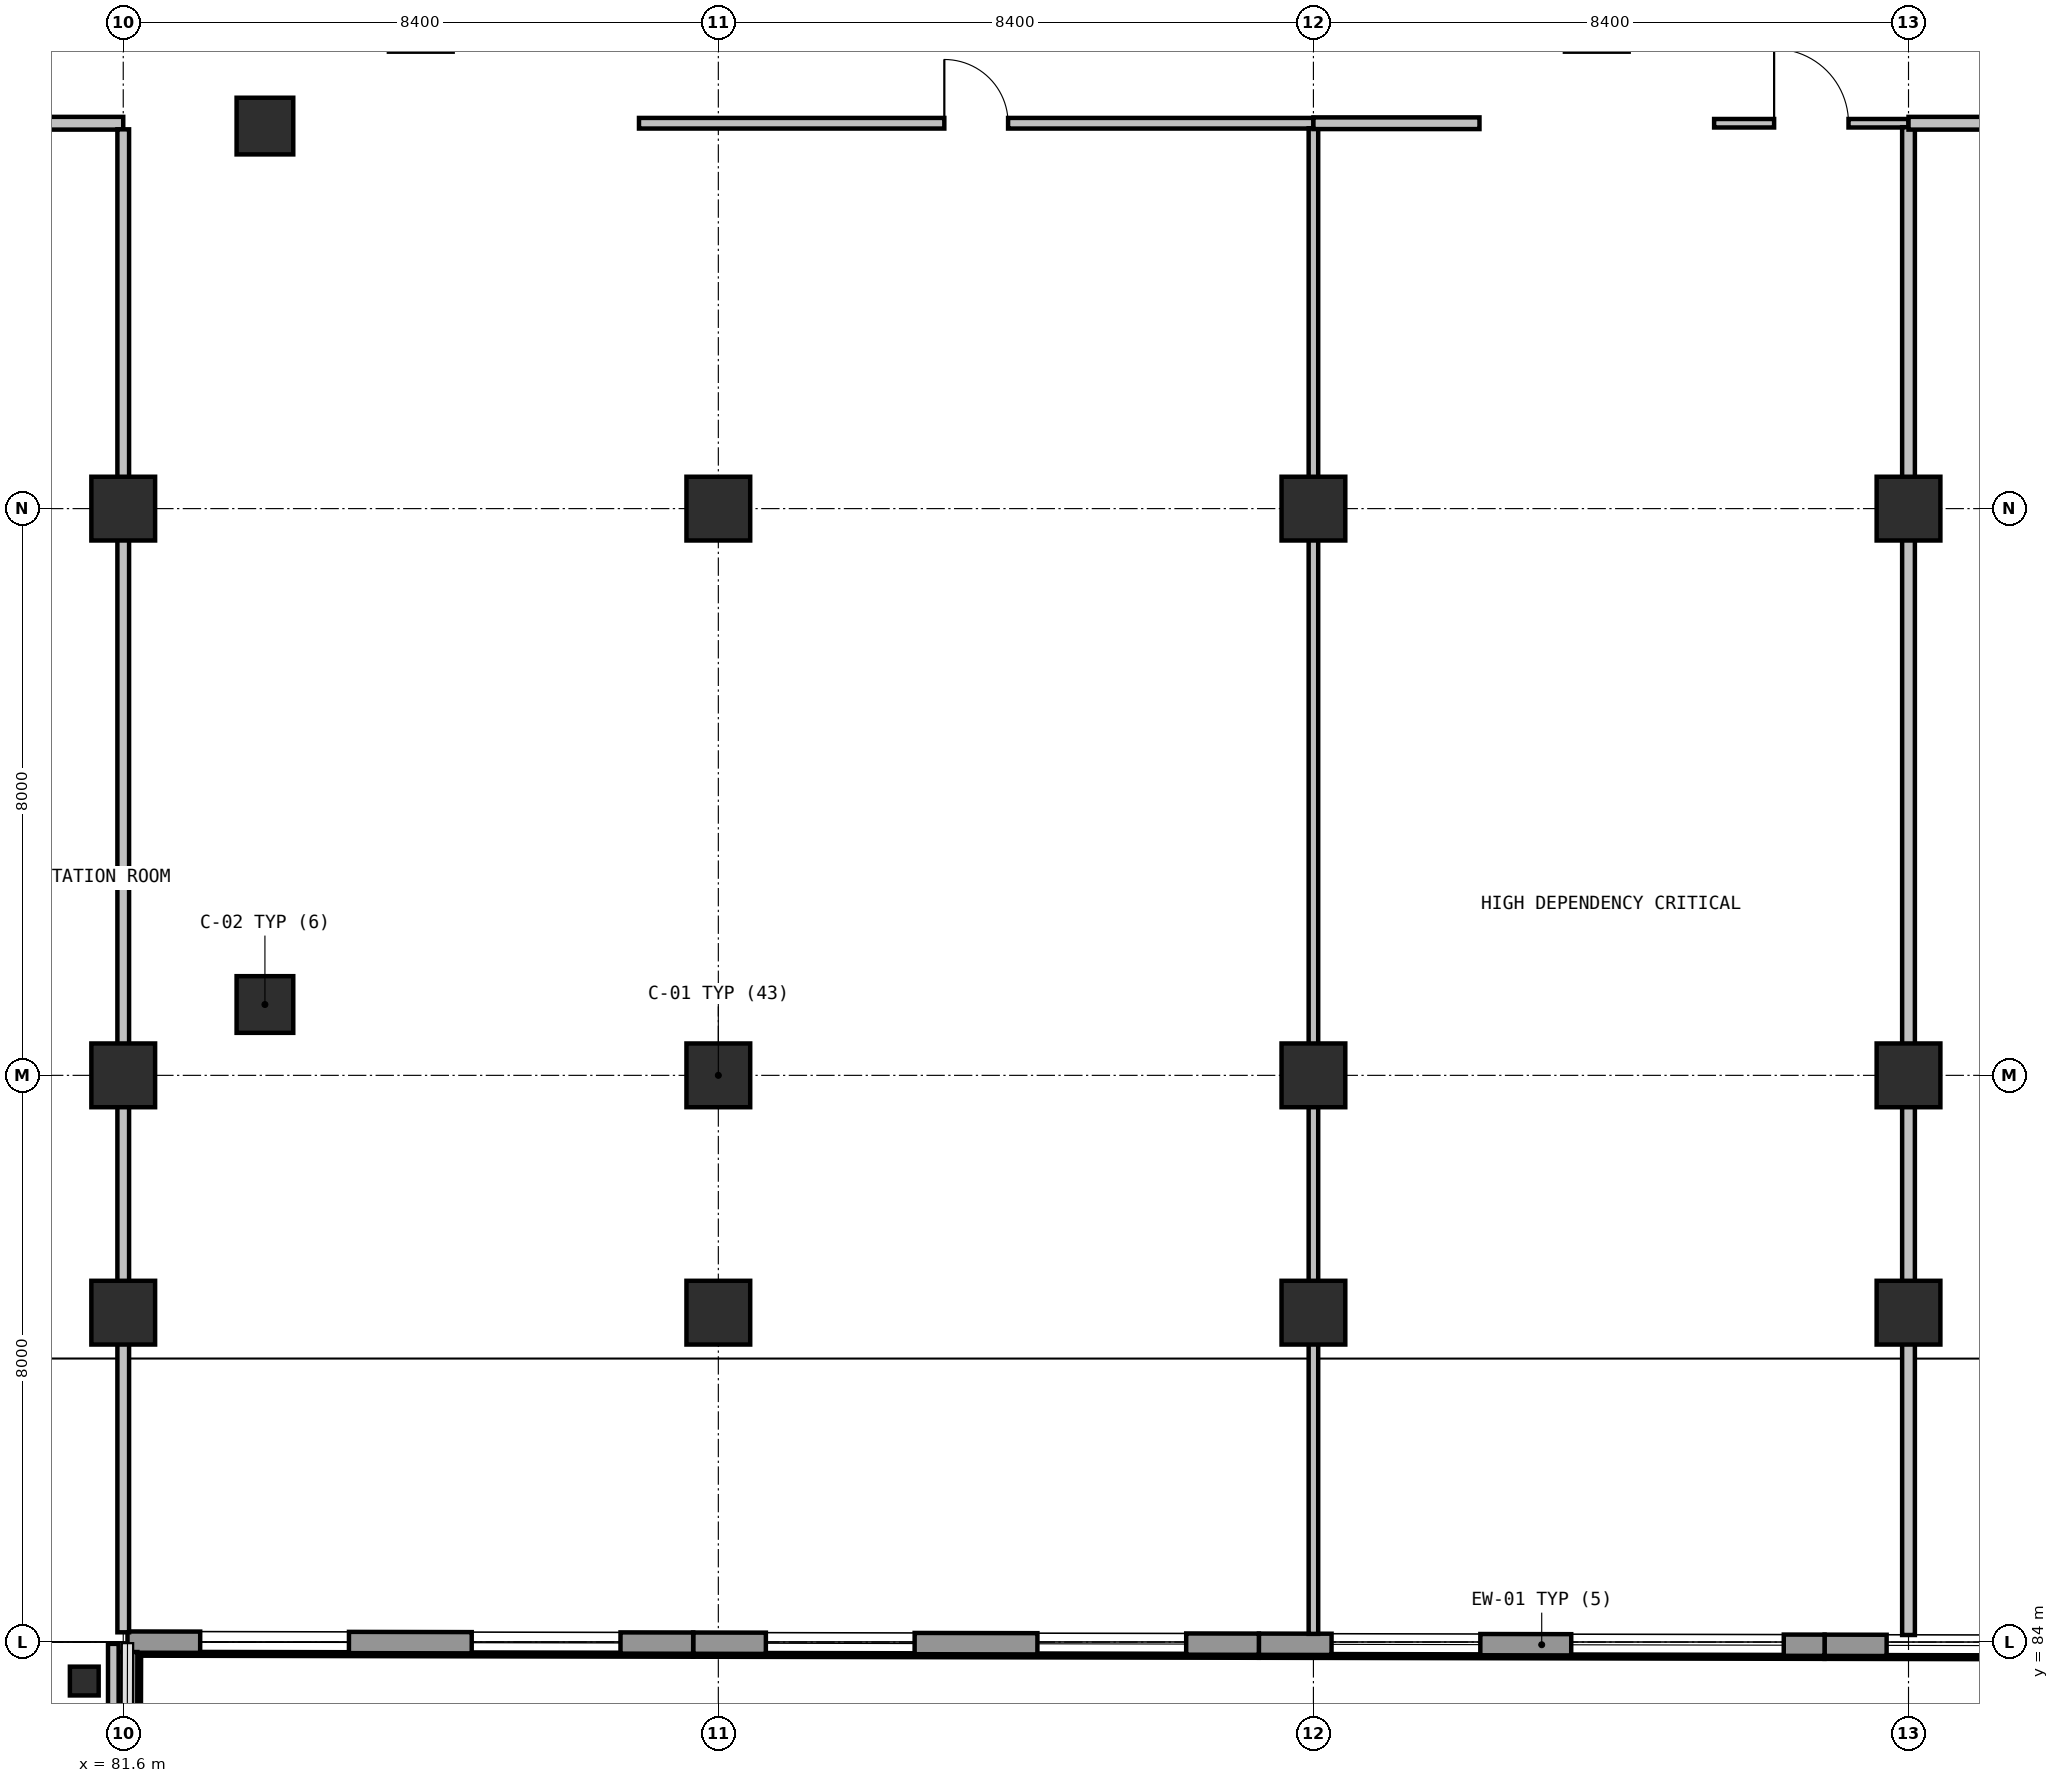
"""IFC4 building model, lengths in metres.
Left out: names, types, materials, properties, quantities, classifications, styles, units other than length and angle.
Written with IfcOpenShell. Run it as: python <this file> out.ifc"""

import sys

from ifc_helpers import new_model, si_unit, direction, frame, frame_2d, origin, origin_2d, place, context, subcontext, project, spatial, rectangle, hollow_circle, extrude, element, fill, save


model = new_model("IFC4")
c1 = context("Model", 3, precision=1e-05, world=origin(), true_north=direction((0.0, 1.0)))
c2 = subcontext(c1, "Body", "Model", "MODEL_VIEW")
j1 = project(units=[si_unit("LENGTHUNIT", "METRE"), si_unit("PLANEANGLEUNIT", "RADIAN")], contexts=[c1])
p1 = place(None, origin())
s1 = spatial("IfcSite", under=j1, at=p1, CompositionType="ELEMENT")
p2 = place(p1, origin())
s2 = spatial("IfcBuilding", under=s1, at=p2, CompositionType="ELEMENT")
p3 = place(p2, frame((0.0, 0.0, 5.4)))
s3 = spatial("IfcBuildingStorey", under=s2, at=p3, CompositionType="ELEMENT", Elevation=5.4)
p4 = place(p3, frame((81.05, 83.45, 0.0), z_axis=(0.0, 0.0, 1.0), x_axis=(1.0, 0.0, 0.0)))
e1 = element("IfcColumn", 1, at=p4, inside=s3, PredefinedType="COLUMN", context=c2, shape_type="SweptSolid", body=[
    extrude(hollow_circle(Radius=0.203, WallThickness=0.016, at=origin_2d()), origin(), (0.0, 0.0, 1.0), 4.8),
])
for number, where, z_axis, x_axis in (
    (2, (83.6, 93.0, 0.0), (0.0, 0.0, 1.0), (1.0, 0.0, 0.0)),
    (3, (83.6, 105.4, 0.0), (0.0, 0.0, 1.0), (1.0, 0.0, 0.0)),
):
    element("IfcColumn", number, at=place(p3, frame(where, z_axis=z_axis, x_axis=x_axis)), inside=s3, PredefinedType="COLUMN", context=c2, shape_type="SweptSolid", body=[
        extrude(rectangle(XDim=0.8, YDim=0.8, at=origin_2d()), origin(), (0.0, 0.0, 1.0), 4.8),
    ])
for number, where, z_axis, x_axis in (
    (4, (81.6, 88.65, 0.0), (0.0, 0.0, 1.0), (1.0, 0.0, 0.0)),
    (5, (81.6, 92.0, 0.0), (0.0, 0.0, 1.0), (1.0, 0.0, 0.0)),
    (6, (81.6, 100.0, 0.0), (0.0, 0.0, 1.0), (1.0, 0.0, 0.0)),
    (7, (90.0, 88.65, 0.0), (0.0, 0.0, 1.0), (1.0, 0.0, 0.0)),
    (8, (90.0, 92.0, 0.0), (0.0, 0.0, 1.0), (1.0, 0.0, 0.0)),
    (9, (90.0, 100.0, 0.0), (0.0, 0.0, 1.0), (1.0, 0.0, 0.0)),
    (10, (98.4, 88.65, 0.0), (0.0, 0.0, 1.0), (1.0, 0.0, 0.0)),
    (11, (98.4, 92.0, 0.0), (0.0, 0.0, 1.0), (1.0, 0.0, 0.0)),
    (12, (98.4, 100.0, 0.0), (0.0, 0.0, 1.0), (1.0, 0.0, 0.0)),
    (13, (106.8, 88.65, 0.0), (0.0, 0.0, 1.0), (1.0, 0.0, 0.0)),
    (14, (106.8, 92.0, 0.0), (0.0, 0.0, 1.0), (1.0, 0.0, 0.0)),
    (15, (106.8, 100.0, 0.0), (0.0, 0.0, 1.0), (1.0, 0.0, 0.0)),
):
    element("IfcColumn", number, at=place(p3, frame(where, z_axis=z_axis, x_axis=x_axis)), inside=s3, PredefinedType="COLUMN", context=c2, shape_type="SweptSolid", body=[
        extrude(rectangle(XDim=0.9, YDim=0.9, at=origin_2d()), origin(), (0.0, 0.0, 1.0), 4.8),
    ])
p5 = place(p3, frame((113.6, 83.94, 0.0), z_axis=(0.0, 0.0, 1.0), x_axis=(-0.99999820332, 0.001895615269, 0.0)))
e16 = element("IfcWall", 16, at=p5, inside=s3, PredefinedType="SOLIDWALL", context=c2, shape_type="SweptSolid", body=[
    extrude(rectangle(XDim=7.985, YDim=0.3, at=frame_2d((3.993, 0.0))), origin(), (0.0, 0.0, 1.0), 4.445),
])
p6 = place(p5, frame((0.876, 0.0, 0.96)))
e17 = element("IfcOpeningElement", 17, at=p6, cuts=e16, PredefinedType="OPENING", context=c2, shape_type="SweptSolid", body=[
    extrude(rectangle(XDim=2.4, YDim=1.2, at=frame_2d((1.2, 0.6))), frame((0.0, 0.16, 0.0), z_axis=(0.0, -1.0, 0.0), x_axis=(1.0, 0.0, 0.0)), (0.0, 0.0, 1.0), 0.32),
])
p7 = place(p5, frame((4.709, 0.0, 0.96)))
e18 = element("IfcOpeningElement", 18, at=p7, cuts=e16, PredefinedType="OPENING", context=c2, shape_type="SweptSolid", body=[
    extrude(rectangle(XDim=2.4, YDim=1.2, at=frame_2d((1.2, 0.6))), frame((0.0, 0.16, 0.0), z_axis=(0.0, -1.0, 0.0), x_axis=(1.0, 0.0, 0.0)), (0.0, 0.0, 1.0), 0.32),
])
p8 = place(p3, frame((105.615, 83.955, 0.0), z_axis=(0.0, 0.0, 1.0), x_axis=(-0.99999826081, 0.001865040936, 0.0)))
e19 = element("IfcWall", 19, at=p8, inside=s3, PredefinedType="SOLIDWALL", context=c2, shape_type="SweptSolid", body=[
    extrude(rectangle(XDim=7.985, YDim=0.3, at=frame_2d((3.993, 0.0))), origin(), (0.0, 0.0, 1.0), 4.445),
])
p9 = place(p8, frame((0.576, 0.0, 0.96)))
e20 = element("IfcOpeningElement", 20, at=p9, cuts=e19, PredefinedType="OPENING", context=c2, shape_type="SweptSolid", body=[
    extrude(rectangle(XDim=3.0, YDim=1.35, at=frame_2d((1.5, 0.675))), frame((0.0, 0.16, 0.0), z_axis=(0.0, -1.0, 0.0), x_axis=(1.0, 0.0, 0.0)), (0.0, 0.0, 1.0), 0.32),
])
p10 = place(p8, frame((4.859, 0.0, 0.96)))
e21 = element("IfcOpeningElement", 21, at=p10, cuts=e19, PredefinedType="OPENING", context=c2, shape_type="SweptSolid", body=[
    extrude(rectangle(XDim=2.1, YDim=1.5, at=frame_2d((1.05, 0.75))), frame((0.0, 0.16, 0.0), z_axis=(0.0, -1.0, 0.0), x_axis=(1.0, 0.0, 0.0)), (0.0, 0.0, 1.0), 0.32),
])
p11 = place(p3, frame((97.63, 83.97, 0.0), z_axis=(0.0, 0.0, 1.0), x_axis=(-0.99999820321, 0.001895673228, 0.0)))
e22 = element("IfcWall", 22, at=p11, inside=s3, PredefinedType="SOLIDWALL", context=c2, shape_type="SweptSolid", body=[
    extrude(rectangle(XDim=7.985, YDim=0.3, at=frame_2d((3.992, 0.0))), origin(), (0.0, 0.0, 1.0), 4.445),
])
p12 = place(p11, frame((1.026, 0.0, 0.96)))
e23 = element("IfcOpeningElement", 23, at=p12, cuts=e22, PredefinedType="OPENING", context=c2, shape_type="SweptSolid", body=[
    extrude(rectangle(XDim=2.1, YDim=1.5, at=frame_2d((1.05, 0.75))), frame((0.0, 0.16, 0.0), z_axis=(0.0, -1.0, 0.0), x_axis=(1.0, 0.0, 0.0)), (0.0, 0.0, 1.0), 0.32),
])
p13 = place(p11, frame((4.859, 0.0, 0.96)))
e24 = element("IfcOpeningElement", 24, at=p13, cuts=e22, PredefinedType="OPENING", context=c2, shape_type="SweptSolid", body=[
    extrude(rectangle(XDim=2.1, YDim=1.5, at=frame_2d((1.05, 0.75))), frame((0.0, 0.16, 0.0), z_axis=(0.0, -1.0, 0.0), x_axis=(1.0, 0.0, 0.0)), (0.0, 0.0, 1.0), 0.32),
])
p14 = place(p3, frame((89.645, 83.985, 0.0), z_axis=(0.0, 0.0, 1.0), x_axis=(-0.99999826081, 0.001865040936, 0.0)))
e25 = element("IfcWall", 25, at=p14, inside=s3, PredefinedType="SOLIDWALL", context=c2, shape_type="SweptSolid", body=[
    extrude(rectangle(XDim=7.985, YDim=0.3, at=frame_2d((3.993, 0.0))), origin(), (0.0, 0.0, 1.0), 4.445),
])
p15 = place(p14, frame((1.026, 0.0, 0.96)))
e26 = element("IfcOpeningElement", 26, at=p15, cuts=e25, PredefinedType="OPENING", context=c2, shape_type="SweptSolid", body=[
    extrude(rectangle(XDim=2.1, YDim=1.5, at=frame_2d((1.05, 0.75))), frame((0.0, 0.16, 0.0), z_axis=(0.0, -1.0, 0.0), x_axis=(1.0, 0.0, 0.0)), (0.0, 0.0, 1.0), 0.32),
])
p16 = place(p14, frame((4.859, 0.0, 0.96)))
e27 = element("IfcOpeningElement", 27, at=p16, cuts=e25, PredefinedType="OPENING", context=c2, shape_type="SweptSolid", body=[
    extrude(rectangle(XDim=2.1, YDim=1.5, at=frame_2d((1.05, 0.75))), frame((0.0, 0.16, 0.0), z_axis=(0.0, -1.0, 0.0), x_axis=(1.0, 0.0, 0.0)), (0.0, 0.0, 1.0), 0.32),
])
p17 = place(p3, frame((81.66, 83.86, 0.0), z_axis=(0.0, 0.0, 1.0), x_axis=(-0.002554110965, -0.999996738253, 0.0)))
e28 = element("IfcWall", 28, at=p17, inside=s3, PredefinedType="SOLIDWALL", context=c2, shape_type="SweptSolid", body=[
    extrude(rectangle(XDim=7.838, YDim=0.28, at=frame_2d((3.919, 0.0))), origin(), (0.0, 0.0, 1.0), 0.94),
])
p18 = place(p3, frame((79.316, 105.44, 0.0), z_axis=(0.0, 0.0, 1.0), x_axis=(1.0, 0.0, 0.0)))
e29 = element("IfcWall", 29, at=p18, inside=s3, PredefinedType="PARTITIONING", context=c2, shape_type="SweptSolid", body=[
    extrude(rectangle(XDim=2.284, YDim=0.18, at=frame_2d((1.142, 0.0))), origin(), (0.0, 0.0, 1.0), 3.695),
])
p19 = place(p3, frame((81.6, 105.354, 0.0), z_axis=(0.0, 0.0, 1.0), x_axis=(0.0, -1.0, 0.0)))
e30 = element("IfcWall", 30, at=p19, inside=s3, PredefinedType="PARTITIONING", context=c2, shape_type="SweptSolid", body=[
    extrude(rectangle(XDim=21.216, YDim=0.165, at=frame_2d((10.608, 0.0))), origin(), (0.0, 0.0, 1.0), 3.695),
])
p20 = place(p3, frame((81.46, 83.975, 0.0), z_axis=(0.0, 0.0, 1.0), x_axis=(0.0, -1.0, 0.0)))
e31 = element("IfcWall", 31, at=p20, inside=s3, PredefinedType="PARTITIONING", context=c2, shape_type="SweptSolid", body=[
    extrude(rectangle(XDim=4.351, YDim=0.15, at=frame_2d((2.176, 0.0))), origin(), (0.0, 0.0, 1.0), 4.445),
])
p21 = place(p3, frame((88.88, 105.44, 0.0), z_axis=(0.0, 0.0, 1.0), x_axis=(1.0, 0.0, 0.0)))
e32 = element("IfcWall", 32, at=p21, inside=s3, PredefinedType="PARTITIONING", context=c2, shape_type="SweptSolid", body=[
    extrude(rectangle(XDim=9.52, YDim=0.15, at=frame_2d((4.76, 0.0))), origin(), (0.0, 0.0, 1.0), 4.445),
])
p22 = place(p21, frame((4.31, 0.0, 0.0)))
e33 = element("IfcOpeningElement", 33, at=p22, cuts=e32, PredefinedType="OPENING", context=c2, shape_type="SweptSolid", body=[
    extrude(rectangle(XDim=0.9, YDim=2.1, at=frame_2d((0.45, 1.05))), frame((0.0, 0.085, 0.0), z_axis=(0.0, -1.0, 0.0), x_axis=(1.0, 0.0, 0.0)), (0.0, 0.0, 1.0), 0.17),
])
p23 = place(p3, frame((98.4, 105.369, 0.0), z_axis=(0.0, 0.0, 1.0), x_axis=(0.0, -1.0, 0.0)))
e34 = element("IfcWall", 34, at=p23, inside=s3, PredefinedType="PARTITIONING", context=c2, shape_type="SweptSolid", body=[
    extrude(rectangle(XDim=21.253, YDim=0.135, at=frame_2d((10.626, 0.0))), origin(), (0.0, 0.0, 1.0), 3.695),
])
p24 = place(p3, frame((104.056, 105.44, 0.0), z_axis=(0.0, 0.0, 1.0), x_axis=(1.0, 0.0, 0.0)))
e35 = element("IfcWall", 35, at=p24, inside=s3, PredefinedType="PARTITIONING", context=c2, shape_type="SweptSolid", body=[
    extrude(rectangle(XDim=2.744, YDim=0.12, at=frame_2d((1.372, 0.0))), origin(), (0.0, 0.0, 1.0), 4.445),
])
p25 = place(p24, frame((0.847, 0.0, 0.0)))
e36 = element("IfcOpeningElement", 36, at=p25, cuts=e35, PredefinedType="OPENING", context=c2, shape_type="SweptSolid", body=[
    extrude(rectangle(XDim=1.05, YDim=2.15, at=frame_2d((0.525, 1.075))), frame((0.0, 0.07, 0.0), z_axis=(0.0, -1.0, 0.0), x_axis=(1.0, 0.0, 0.0)), (0.0, 0.0, 1.0), 0.14),
])
p26 = place(p3, frame((106.8, 105.384, 0.0), z_axis=(0.0, 0.0, 1.0), x_axis=(0.0, -1.0, 0.0)))
e37 = element("IfcWall", 37, at=p26, inside=s3, PredefinedType="PARTITIONING", context=c2, shape_type="SweptSolid", body=[
    extrude(rectangle(XDim=21.284, YDim=0.18, at=frame_2d((10.642, 0.0))), origin(), (0.0, 0.0, 1.0), 3.695),
])
p27 = place(p3, frame((98.4, 105.44, 0.0), z_axis=(0.0, 0.0, 1.0), x_axis=(1.0, 0.0, 0.0)))
e38 = element("IfcWall", 38, at=p27, inside=s3, PredefinedType="PARTITIONING", context=c2, shape_type="SweptSolid", body=[
    extrude(rectangle(XDim=2.344, YDim=0.165, at=frame_2d((1.172, 0.0))), origin(), (0.0, 0.0, 1.0), 4.445),
])
p28 = place(p3, frame((106.8, 105.44, 0.0), z_axis=(0.0, 0.0, 1.0), x_axis=(1.0, 0.0, 0.0)))
e39 = element("IfcWall", 39, at=p28, inside=s3, PredefinedType="PARTITIONING", context=c2, shape_type="SweptSolid", body=[
    extrude(rectangle(XDim=6.744, YDim=0.18, at=frame_2d((3.372, 0.0))), origin(), (0.0, 0.0, 1.0), 4.445),
])
p29 = place(p7, origin())
e40 = element("IfcWindow", 40, at=p29, inside=s3, PartitioningType="SINGLE_PANEL", PredefinedType="WINDOW", context=c2, shape_type="SweptSolid", body=[
    extrude(rectangle(XDim=2.4, YDim=1.2, at=frame_2d((1.2, 0.6))), frame((0.0, 0.03, 0.0), z_axis=(0.0, -1.0, 0.0), x_axis=(1.0, 0.0, 0.0)), (0.0, 0.0, 1.0), 0.06),
])
fill(e18, e40)
p30 = place(p9, origin())
e41 = element("IfcWindow", 41, at=p30, inside=s3, PartitioningType="SINGLE_PANEL", PredefinedType="WINDOW", context=c2, shape_type="SweptSolid", body=[
    extrude(rectangle(XDim=3.0, YDim=1.35, at=frame_2d((1.5, 0.675))), frame((0.0, 0.03, 0.0), z_axis=(0.0, -1.0, 0.0), x_axis=(1.0, 0.0, 0.0)), (0.0, 0.0, 1.0), 0.06),
])
fill(e20, e41)
p31 = place(p10, origin())
e42 = element("IfcWindow", 42, at=p31, inside=s3, PartitioningType="SINGLE_PANEL", PredefinedType="WINDOW", context=c2, shape_type="SweptSolid", body=[
    extrude(rectangle(XDim=2.1, YDim=1.5, at=frame_2d((1.05, 0.75))), frame((0.0, 0.03, 0.0), z_axis=(0.0, -1.0, 0.0), x_axis=(1.0, 0.0, 0.0)), (0.0, 0.0, 1.0), 0.06),
])
fill(e21, e42)
p32 = place(p12, origin())
e43 = element("IfcWindow", 43, at=p32, inside=s3, PartitioningType="SINGLE_PANEL", PredefinedType="WINDOW", context=c2, shape_type="SweptSolid", body=[
    extrude(rectangle(XDim=2.1, YDim=1.5, at=frame_2d((1.05, 0.75))), frame((0.0, 0.03, 0.0), z_axis=(0.0, -1.0, 0.0), x_axis=(1.0, 0.0, 0.0)), (0.0, 0.0, 1.0), 0.06),
])
fill(e23, e43)
p33 = place(p13, origin())
e44 = element("IfcWindow", 44, at=p33, inside=s3, PartitioningType="SINGLE_PANEL", PredefinedType="WINDOW", context=c2, shape_type="SweptSolid", body=[
    extrude(rectangle(XDim=2.1, YDim=1.5, at=frame_2d((1.05, 0.75))), frame((0.0, 0.03, 0.0), z_axis=(0.0, -1.0, 0.0), x_axis=(1.0, 0.0, 0.0)), (0.0, 0.0, 1.0), 0.06),
])
fill(e24, e44)
p34 = place(p15, origin())
e45 = element("IfcWindow", 45, at=p34, inside=s3, PartitioningType="SINGLE_PANEL", PredefinedType="WINDOW", context=c2, shape_type="SweptSolid", body=[
    extrude(rectangle(XDim=2.1, YDim=1.5, at=frame_2d((1.05, 0.75))), frame((0.0, 0.03, 0.0), z_axis=(0.0, -1.0, 0.0), x_axis=(1.0, 0.0, 0.0)), (0.0, 0.0, 1.0), 0.06),
])
fill(e26, e45)
p35 = place(p16, origin())
e46 = element("IfcWindow", 46, at=p35, inside=s3, PartitioningType="SINGLE_PANEL", PredefinedType="WINDOW", context=c2, shape_type="SweptSolid", body=[
    extrude(rectangle(XDim=2.1, YDim=1.5, at=frame_2d((1.05, 0.75))), frame((0.0, 0.03, 0.0), z_axis=(0.0, -1.0, 0.0), x_axis=(1.0, 0.0, 0.0)), (0.0, 0.0, 1.0), 0.06),
])
fill(e27, e46)
p36 = place(p22, origin())
e47 = element("IfcDoor", 47, at=p36, inside=s3, OperationType="SINGLE_SWING_LEFT", PredefinedType="DOOR", context=c2, shape_type="SweptSolid", body=[
    extrude(rectangle(XDim=0.9, YDim=2.1, at=frame_2d((0.45, 1.05))), frame((0.0, 0.025, 0.0), z_axis=(0.0, -1.0, 0.0), x_axis=(1.0, 0.0, 0.0)), (0.0, 0.0, 1.0), 0.05),
])
fill(e33, e47)
p37 = place(p25, origin())
e48 = element("IfcDoor", 48, at=p37, inside=s3, OperationType="SINGLE_SWING_RIGHT", PredefinedType="DOOR", context=c2, shape_type="SweptSolid", body=[
    extrude(rectangle(XDim=1.05, YDim=2.15, at=frame_2d((0.525, 1.075))), frame((0.0, 0.025, 0.0), z_axis=(0.0, -1.0, 0.0), x_axis=(1.0, 0.0, 0.0)), (0.0, 0.0, 1.0), 0.05),
])
fill(e36, e48)
save(model, sys.argv[1])
